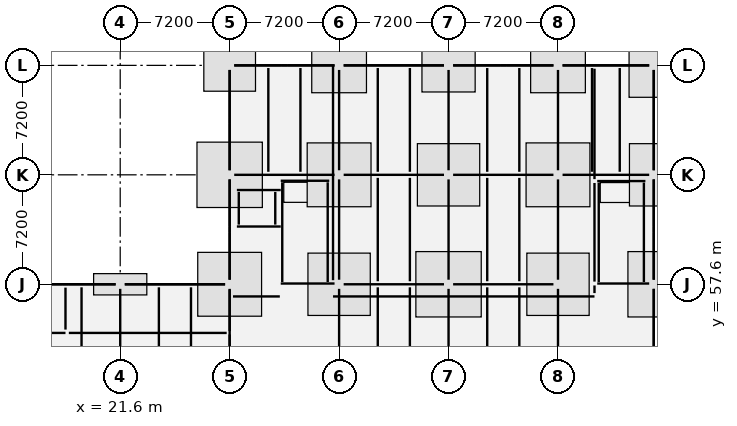
"""IFC4 building model, lengths in metres.
Left out: names, types, materials, properties, quantities, classifications, styles, units other than length and angle.
Written with IfcOpenShell. Run it as: python <this file> out.ifc"""

import sys

from ifc_helpers import new_model, si_unit, direction, frame, frame_2d, origin, origin_2d, place, context, subcontext, project, spatial, rectangle, extrude, element, fill, save


model = new_model("IFC4")
c1 = context("Model", 3, precision=1e-05, world=origin(), true_north=direction((0.0, 1.0)))
c2 = subcontext(c1, "Body", "Model", "MODEL_VIEW")
j1 = project(units=[si_unit("LENGTHUNIT", "METRE"), si_unit("PLANEANGLEUNIT", "RADIAN")], contexts=[c1])
p1 = place(None, origin())
s1 = spatial("IfcSite", under=j1, at=p1, CompositionType="ELEMENT")
p2 = place(p1, origin())
s2 = spatial("IfcBuilding", under=s1, at=p2, CompositionType="ELEMENT")
p3 = place(p2, origin())
s3 = spatial("IfcBuildingStorey", under=s2, at=p3, CompositionType="ELEMENT", Elevation=0.0)
for number, where, z_axis, x_axis in (
    (1, (21.6, 57.6, 0.0), (0.0, 0.0, 1.0), (1.0, 0.0, 0.0)),
    (2, (28.8, 57.6, 0.0), (0.0, 0.0, 1.0), (1.0, 0.0, 0.0)),
    (3, (28.8, 64.8, 0.0), (0.0, 0.0, 1.0), (1.0, 0.0, 0.0)),
    (4, (28.8, 72.0, 0.0), (0.0, 0.0, 1.0), (1.0, 0.0, 0.0)),
    (5, (36.0, 57.6, 0.0), (0.0, 0.0, 1.0), (1.0, 0.0, 0.0)),
    (6, (36.0, 64.8, 0.0), (0.0, 0.0, 1.0), (1.0, 0.0, 0.0)),
    (7, (36.0, 72.0, 0.0), (0.0, 0.0, 1.0), (1.0, 0.0, 0.0)),
    (8, (43.2, 57.6, 0.0), (0.0, 0.0, 1.0), (1.0, 0.0, 0.0)),
    (9, (43.2, 64.8, 0.0), (0.0, 0.0, 1.0), (1.0, 0.0, 0.0)),
    (10, (43.2, 72.0, 0.0), (0.0, 0.0, 1.0), (1.0, 0.0, 0.0)),
    (11, (50.4, 57.6, 0.0), (0.0, 0.0, 1.0), (1.0, 0.0, 0.0)),
    (12, (50.4, 64.8, 0.0), (0.0, 0.0, 1.0), (1.0, 0.0, 0.0)),
    (13, (50.4, 72.0, 0.0), (0.0, 0.0, 1.0), (1.0, 0.0, 0.0)),
    (14, (56.7, 57.6, 0.0), (0.0, 0.0, 1.0), (1.0, 0.0, 0.0)),
    (15, (56.7, 64.8, 0.0), (0.0, 0.0, 1.0), (1.0, 0.0, 0.0)),
    (16, (56.7, 72.0, 0.0), (0.0, 0.0, 1.0), (1.0, 0.0, 0.0)),
):
    element("IfcColumn", number, at=place(p3, frame(where, z_axis=z_axis, x_axis=x_axis)), inside=s3, PredefinedType="COLUMN", context=c2, shape_type="SweptSolid", body=[
        extrude(rectangle(XDim=0.6, YDim=0.6, at=origin_2d()), origin(), (0.0, 0.0, 1.0), 5.4),
    ])
p4 = place(p3, frame((29.275, 61.4, 0.0), z_axis=(0.0, 0.0, 1.0), x_axis=(1.0, 0.0, 0.0)))
e17 = element("IfcWall", 17, at=p4, inside=s3, PredefinedType="SHEAR", context=c2, shape_type="SweptSolid", body=[
    extrude(rectangle(XDim=2.885, YDim=0.25, at=frame_2d((1.442, 0.0))), origin(), (0.0, 0.0, 1.0), 5.15),
])
p5 = place(p4, frame((0.942, 0.0, 0.0)))
e18 = element("IfcOpeningElement", 18, at=p5, cuts=e17, PredefinedType="OPENING", context=c2, shape_type="SweptSolid", body=[
    extrude(rectangle(XDim=1.0, YDim=2.1, at=frame_2d((0.5, 1.05))), frame((0.0, 0.137, 0.0), z_axis=(0.0, -1.0, 0.0), x_axis=(1.0, 0.0, 0.0)), (0.0, 0.0, 1.0), 0.274),
])
p6 = place(p3, frame((29.275, 63.8, 0.0), z_axis=(0.0, 0.0, 1.0), x_axis=(1.0, 0.0, 0.0)))
e19 = element("IfcWall", 19, at=p6, inside=s3, PredefinedType="SHEAR", context=c2, shape_type="SweptSolid", body=[
    extrude(rectangle(XDim=2.885, YDim=0.25, at=frame_2d((1.442, 0.0))), origin(), (0.0, 0.0, 1.0), 5.15),
])
for number, where, z_axis, x_axis in (
    (20, (29.4, 61.525, 0.0), (0.0, 0.0, 1.0), (0.0, 1.0, 0.0)),
    (21, (31.8, 61.525, 0.0), (0.0, 0.0, 1.0), (0.0, 1.0, 0.0)),
):
    element("IfcWall", number, at=place(p3, frame(where, z_axis=z_axis, x_axis=x_axis)), inside=s3, PredefinedType="SHEAR", context=c2, shape_type="SweptSolid", body=[
        extrude(rectangle(XDim=2.15, YDim=0.25, at=frame_2d((1.075, 0.0))), origin(), (0.0, 0.0, 1.0), 5.15),
    ])
p7 = place(p3, frame((32.16, 57.65, 0.0), z_axis=(0.0, 0.0, 1.0), x_axis=(1.0, 0.0, 0.0)))
e22 = element("IfcWall", 22, at=p7, inside=s3, PredefinedType="SHEAR", context=c2, shape_type="SweptSolid", body=[
    extrude(rectangle(XDim=3.54, YDim=0.2, at=frame_2d((1.77, 0.0))), origin(), (0.0, 0.0, 1.0), 5.15),
])
p8 = place(p7, frame((1.22, 0.0, 0.0)))
e23 = element("IfcOpeningElement", 23, at=p8, cuts=e22, PredefinedType="OPENING", context=c2, shape_type="SweptSolid", body=[
    extrude(rectangle(XDim=1.1, YDim=2.15, at=frame_2d((0.55, 1.075))), frame((0.0, 0.112, 0.0), z_axis=(0.0, -1.0, 0.0), x_axis=(1.0, 0.0, 0.0)), (0.0, 0.0, 1.0), 0.224),
])
p9 = place(p3, frame((32.16, 64.41, 0.0), z_axis=(0.0, 0.0, 1.0), x_axis=(1.0, 0.0, 0.0)))
e24 = element("IfcWall", 24, at=p9, inside=s3, PredefinedType="SHEAR", context=c2, shape_type="SweptSolid", body=[
    extrude(rectangle(XDim=3.19, YDim=0.2, at=frame_2d((1.595, 0.0))), origin(), (0.0, 0.0, 1.0), 5.15),
])
for number, where, z_axis, x_axis in (
    (25, (32.26, 57.75, 0.0), (0.0, 0.0, 1.0), (0.0, 1.0, 0.0)),
    (26, (35.25, 57.75, 0.0), (0.0, 0.0, 1.0), (0.0, 1.0, 0.0)),
):
    element("IfcWall", number, at=place(p3, frame(where, z_axis=z_axis, x_axis=x_axis)), inside=s3, PredefinedType="SHEAR", context=c2, shape_type="SweptSolid", body=[
        extrude(rectangle(XDim=6.56, YDim=0.2, at=frame_2d((3.28, 0.0))), origin(), (0.0, 0.0, 1.0), 5.15),
    ])
p10 = place(p3, frame((52.98, 57.65, 0.0), z_axis=(0.0, 0.0, 1.0), x_axis=(1.0, 0.0, 0.0)))
e27 = element("IfcWall", 27, at=p10, inside=s3, PredefinedType="SHEAR", context=c2, shape_type="SweptSolid", body=[
    extrude(rectangle(XDim=3.42, YDim=0.2, at=frame_2d((1.71, 0.0))), origin(), (0.0, 0.0, 1.0), 5.15),
])
p11 = place(p10, frame((1.16, 0.0, 0.0)))
e28 = element("IfcOpeningElement", 28, at=p11, cuts=e27, PredefinedType="OPENING", context=c2, shape_type="SweptSolid", body=[
    extrude(rectangle(XDim=1.1, YDim=2.15, at=frame_2d((0.55, 1.075))), frame((0.0, 0.112, 0.0), z_axis=(0.0, -1.0, 0.0), x_axis=(1.0, 0.0, 0.0)), (0.0, 0.0, 1.0), 0.224),
])
p12 = place(p3, frame((52.98, 64.39, 0.0), z_axis=(0.0, 0.0, 1.0), x_axis=(1.0, 0.0, 0.0)))
e29 = element("IfcWall", 29, at=p12, inside=s3, PredefinedType="SHEAR", context=c2, shape_type="SweptSolid", body=[
    extrude(rectangle(XDim=3.17, YDim=0.2, at=frame_2d((1.585, 0.0))), origin(), (0.0, 0.0, 1.0), 5.15),
])
for number, where, z_axis, x_axis in (
    (30, (53.08, 57.75, 0.0), (0.0, 0.0, 1.0), (0.0, 1.0, 0.0)),
    (31, (56.05, 57.75, 0.0), (0.0, 0.0, 1.0), (0.0, 1.0, 0.0)),
):
    element("IfcWall", number, at=place(p3, frame(where, z_axis=z_axis, x_axis=x_axis)), inside=s3, PredefinedType="SHEAR", context=c2, shape_type="SweptSolid", body=[
        extrude(rectangle(XDim=6.54, YDim=0.2, at=frame_2d((3.27, 0.0))), origin(), (0.0, 0.0, 1.0), 5.15),
    ])
p13 = place(p3, frame((17.8, 57.6, 0.0), z_axis=(0.0, 0.0, 1.0), x_axis=(1.0, 0.0, 0.0)))
e32 = element("IfcWall", 32, at=p13, inside=s3, PredefinedType="SOLIDWALL", context=c2, shape_type="SweptSolid", body=[
    extrude(rectangle(XDim=0.4, YDim=0.36, at=frame_2d((0.2, 0.0))), origin(), (0.0, 0.0, 1.0), 4.45),
])
p14 = place(p3, frame((21.9, 57.6, 0.0), z_axis=(0.0, 0.0, 1.0), x_axis=(1.0, 0.0, 0.0)))
e33 = element("IfcWall", 33, at=p14, inside=s3, PredefinedType="ELEMENTEDWALL", context=c2, shape_type="SweptSolid", body=[
    extrude(rectangle(XDim=6.6, YDim=0.32, at=frame_2d((3.3, 0.0))), origin(), (0.0, 0.0, 1.0), 4.4),
])
p15 = place(p14, frame((2.625, 0.0, 0.85)))
e34 = element("IfcOpeningElement", 34, at=p15, cuts=e33, PredefinedType="OPENING", context=c2, shape_type="SweptSolid", body=[
    extrude(rectangle(XDim=1.35, YDim=2.0, at=frame_2d((0.675, 1.0))), frame((0.0, 0.172, 0.0), z_axis=(0.0, -1.0, 0.0), x_axis=(1.0, 0.0, 0.0)), (0.0, 0.0, 1.0), 0.344),
])
p16 = place(p3, frame((28.8, 61.0, 0.0), z_axis=(0.0, 0.0, 1.0), x_axis=(0.0, 1.0, 0.0)))
e35 = element("IfcWall", 35, at=p16, inside=s3, PredefinedType="SOLIDWALL", context=c2, shape_type="SweptSolid", body=[
    extrude(rectangle(XDim=0.4, YDim=0.36, at=frame_2d((0.2, 0.0))), origin(), (0.0, 0.0, 1.0), 4.54),
])
for number, where, z_axis, x_axis in (
    (36, (28.8, 68.2, 0.0), (0.0, 0.0, 1.0), (0.0, 1.0, 0.0)),
    (37, (32.2, 72.0, 0.0), (0.0, 0.0, 1.0), (1.0, 0.0, 0.0)),
):
    element("IfcWall", number, at=place(p3, frame(where, z_axis=z_axis, x_axis=x_axis)), inside=s3, PredefinedType="SOLIDWALL", context=c2, shape_type="SweptSolid", body=[
        extrude(rectangle(XDim=0.4, YDim=0.36, at=frame_2d((0.2, 0.0))), origin(), (0.0, 0.0, 1.0), 4.49),
    ])
p17 = place(p3, frame((36.3, 72.0, 0.0), z_axis=(0.0, 0.0, 1.0), x_axis=(1.0, 0.0, 0.0)))
e38 = element("IfcWall", 38, at=p17, inside=s3, PredefinedType="ELEMENTEDWALL", context=c2, shape_type="SweptSolid", body=[
    extrude(rectangle(XDim=6.6, YDim=0.32, at=frame_2d((3.3, 0.0))), origin(), (0.0, 0.0, 1.0), 4.49),
])
p18 = place(p17, frame((2.25, 0.0, 0.85)))
e39 = element("IfcOpeningElement", 39, at=p18, cuts=e38, PredefinedType="OPENING", context=c2, shape_type="SweptSolid", body=[
    extrude(rectangle(XDim=2.1, YDim=2.15, at=frame_2d((1.05, 1.075))), frame((0.0, 0.172, 0.0), z_axis=(0.0, -1.0, 0.0), x_axis=(1.0, 0.0, 0.0)), (0.0, 0.0, 1.0), 0.344),
])
p19 = place(p3, frame((46.6, 72.0, 0.0), z_axis=(0.0, 0.0, 1.0), x_axis=(1.0, 0.0, 0.0)))
e40 = element("IfcWall", 40, at=p19, inside=s3, PredefinedType="SOLIDWALL", context=c2, shape_type="SweptSolid", body=[
    extrude(rectangle(XDim=0.4, YDim=0.36, at=frame_2d((0.2, 0.0))), origin(), (0.0, 0.0, 1.0), 4.49),
])
p20 = place(p3, frame((50.7, 72.0, 0.0), z_axis=(0.0, 0.0, 1.0), x_axis=(1.0, 0.0, 0.0)))
e41 = element("IfcWall", 41, at=p20, inside=s3, PredefinedType="ELEMENTEDWALL", context=c2, shape_type="SweptSolid", body=[
    extrude(rectangle(XDim=5.7, YDim=0.32, at=frame_2d((2.85, 0.0))), origin(), (0.0, 0.0, 1.0), 4.49),
])
p21 = place(p3, frame((56.7, 68.6, 0.0), z_axis=(0.0, 0.0, 1.0), x_axis=(0.0, -1.0, 0.0)))
e42 = element("IfcWall", 42, at=p21, inside=s3, PredefinedType="SOLIDWALL", context=c2, shape_type="SweptSolid", body=[
    extrude(rectangle(XDim=0.4, YDim=0.36, at=frame_2d((0.2, 0.0))), origin(), (0.0, 0.0, 1.0), 4.49),
])
p22 = place(p3, frame((56.7, 61.4, 0.0), z_axis=(0.0, 0.0, 1.0), x_axis=(0.0, -1.0, 0.0)))
e43 = element("IfcWall", 43, at=p22, inside=s3, PredefinedType="SOLIDWALL", context=c2, shape_type="SweptSolid", body=[
    extrude(rectangle(XDim=0.4, YDim=0.36, at=frame_2d((0.2, 0.0))), origin(), (0.0, 0.0, 1.0), 4.54),
])
p23 = place(p3, frame((56.7, 57.3, 0.0), z_axis=(0.0, 0.0, 1.0), x_axis=(0.0, -1.0, 0.0)))
e44 = element("IfcWall", 44, at=p23, inside=s3, PredefinedType="ELEMENTEDWALL", context=c2, shape_type="SweptSolid", body=[
    extrude(rectangle(XDim=6.6, YDim=0.32, at=frame_2d((3.3, 0.0))), origin(), (0.0, 0.0, 1.0), 4.49),
])
p24 = place(p23, frame((2.4, 0.0, 0.0)))
e45 = element("IfcOpeningElement", 45, at=p24, cuts=e44, PredefinedType="OPENING", context=c2, shape_type="SweptSolid", body=[
    extrude(rectangle(XDim=1.8, YDim=2.2, at=frame_2d((0.9, 1.1))), frame((0.0, 0.172, 0.0), z_axis=(0.0, -1.0, 0.0), x_axis=(1.0, 0.0, 0.0)), (0.0, 0.0, 1.0), 0.344),
])
p25 = place(p3, frame((28.8, 52.1, 0.0), z_axis=(0.0, 0.0, 1.0), x_axis=(0.0, 1.0, 0.0)))
e46 = element("IfcWall", 46, at=p25, inside=s3, PredefinedType="PARTITIONING", context=c2, shape_type="SweptSolid", body=[
    extrude(rectangle(XDim=2.2, YDim=0.14, at=frame_2d((1.1, 0.0))), origin(), (0.0, 0.0, 1.0), 4.488),
])
p26 = place(p25, frame((0.25, 0.0, 0.0)))
e47 = element("IfcOpeningElement", 47, at=p26, cuts=e46, PredefinedType="OPENING", context=c2, shape_type="SweptSolid", body=[
    extrude(rectangle(XDim=1.65, YDim=2.2, at=frame_2d((0.825, 1.1))), frame((0.0, 0.082, 0.0), z_axis=(0.0, -1.0, 0.0), x_axis=(1.0, 0.0, 0.0)), (0.0, 0.0, 1.0), 0.164),
])
p27 = place(p3, frame((0.22, 54.4, 0.0), z_axis=(0.0, 0.0, 1.0), x_axis=(1.0, 0.0, 0.0)))
e48 = element("IfcWall", 48, at=p27, inside=s3, PredefinedType="PARTITIONING", context=c2, shape_type="SweptSolid", body=[
    extrude(rectangle(XDim=17.78, YDim=0.12, at=frame_2d((8.89, 0.0))), origin(), (0.0, 0.0, 1.0), 4.488),
])
p28 = place(p27, frame((8.39, 0.0, 0.0)))
e49 = element("IfcOpeningElement", 49, at=p28, cuts=e48, PredefinedType="OPENING", context=c2, shape_type="SweptSolid", body=[
    extrude(rectangle(XDim=1.0, YDim=2.15, at=frame_2d((0.5, 1.075))), frame((0.0, 0.072, 0.0), z_axis=(0.0, -1.0, 0.0), x_axis=(1.0, 0.0, 0.0)), (0.0, 0.0, 1.0), 0.144),
])
p29 = place(p3, frame((18.0, 54.62, 0.0), z_axis=(0.0, 0.0, 1.0), x_axis=(0.0, 1.0, 0.0)))
e50 = element("IfcWall", 50, at=p29, inside=s3, PredefinedType="PARTITIONING", context=c2, shape_type="SweptSolid", body=[
    extrude(rectangle(XDim=2.76, YDim=0.12, at=frame_2d((1.38, 0.0))), origin(), (0.0, 0.0, 1.0), 4.448),
])
p30 = place(p3, frame((18.22, 54.4, 0.0), z_axis=(0.0, 0.0, 1.0), x_axis=(1.0, 0.0, 0.0)))
e51 = element("IfcWall", 51, at=p30, inside=s3, PredefinedType="PLUMBINGWALL", context=c2, shape_type="SweptSolid", body=[
    extrude(rectangle(XDim=10.384, YDim=0.18, at=frame_2d((5.192, 0.0))), origin(), (0.0, 0.0, 1.0), 4.498),
])
p31 = place(p30, frame((4.742, 0.0, 0.0)))
e52 = element("IfcOpeningElement", 52, at=p31, cuts=e51, PredefinedType="OPENING", context=c2, shape_type="SweptSolid", body=[
    extrude(rectangle(XDim=0.9, YDim=2.1, at=frame_2d((0.45, 1.05))), frame((0.0, 0.102, 0.0), z_axis=(0.0, -1.0, 0.0), x_axis=(1.0, 0.0, 0.0)), (0.0, 0.0, 1.0), 0.204),
])
p32 = place(p3, frame((28.8, 54.52, 0.0), z_axis=(0.0, 0.0, 1.0), x_axis=(0.0, 1.0, 0.0)))
e53 = element("IfcWall", 53, at=p32, inside=s3, PredefinedType="PLUMBINGWALL", context=c2, shape_type="SweptSolid", body=[
    extrude(rectangle(XDim=2.74, YDim=0.18, at=frame_2d((1.37, 0.0))), origin(), (0.0, 0.0, 1.0), 4.488),
])
p33 = place(p3, frame((29.02, 56.8, 0.0), z_axis=(0.0, 0.0, 1.0), x_axis=(1.0, 0.0, 0.0)))
e54 = element("IfcWall", 54, at=p33, inside=s3, PredefinedType="STANDARD", context=c2, shape_type="SweptSolid", body=[
    extrude(rectangle(XDim=3.08, YDim=0.22, at=frame_2d((1.54, 0.0))), origin(), (0.0, 0.0, 1.0), 5.12),
])
p34 = place(p33, frame((0.94, 0.0, 0.0)))
e55 = element("IfcOpeningElement", 55, at=p34, cuts=e54, PredefinedType="OPENING", context=c2, shape_type="SweptSolid", body=[
    extrude(rectangle(XDim=1.2, YDim=2.2, at=frame_2d((0.6, 1.1))), frame((0.0, 0.122, 0.0), z_axis=(0.0, -1.0, 0.0), x_axis=(1.0, 0.0, 0.0)), (0.0, 0.0, 1.0), 0.244),
])
p35 = place(p3, frame((35.6, 56.8, 0.0), z_axis=(0.0, 0.0, 1.0), x_axis=(1.0, 0.0, 0.0)))
e56 = element("IfcWall", 56, at=p35, inside=s3, PredefinedType="PARTITIONING", context=c2, shape_type="SweptSolid", body=[
    extrude(rectangle(XDim=17.2, YDim=0.12, at=frame_2d((8.6, 0.0))), origin(), (0.0, 0.0, 1.0), 4.488),
])
p36 = place(p35, frame((8.225, 0.0, 0.0)))
e57 = element("IfcOpeningElement", 57, at=p36, cuts=e56, PredefinedType="OPENING", context=c2, shape_type="SweptSolid", body=[
    extrude(rectangle(XDim=1.25, YDim=2.15, at=frame_2d((0.625, 1.075))), frame((0.0, 0.072, 0.0), z_axis=(0.0, -1.0, 0.0), x_axis=(1.0, 0.0, 0.0)), (0.0, 0.0, 1.0), 0.144),
])
p37 = place(p3, frame((52.8, 57.02, 0.0), z_axis=(0.0, 0.0, 1.0), x_axis=(0.0, 1.0, 0.0)))
e58 = element("IfcWall", 58, at=p37, inside=s3, PredefinedType="PARTITIONING", context=c2, shape_type="SweptSolid", body=[
    extrude(rectangle(XDim=0.504, YDim=0.12, at=frame_2d((0.252, 0.0))), origin(), (0.0, 0.0, 1.0), 5.12),
])
p38 = place(p3, frame((52.8, 57.776, 0.0), z_axis=(0.0, 0.0, 1.0), x_axis=(0.0, 1.0, 0.0)))
e59 = element("IfcWall", 59, at=p38, inside=s3, PredefinedType="PARTITIONING", context=c2, shape_type="SweptSolid", body=[
    extrude(rectangle(XDim=6.488, YDim=0.12, at=frame_2d((3.244, 0.0))), origin(), (0.0, 0.0, 1.0), 5.12),
])
p39 = place(p3, frame((52.8, 64.516, 0.0), z_axis=(0.0, 0.0, 1.0), x_axis=(0.0, 1.0, 0.0)))
e60 = element("IfcWall", 60, at=p39, inside=s3, PredefinedType="PARTITIONING", context=c2, shape_type="SweptSolid", body=[
    extrude(rectangle(XDim=7.264, YDim=0.12, at=frame_2d((3.632, 0.0))), origin(), (0.0, 0.0, 1.0), 4.388),
])
p40 = place(p3, frame((35.6, 57.87, 0.0), z_axis=(0.0, 0.0, 1.0), x_axis=(0.0, 1.0, 0.0)))
e61 = element("IfcWall", 61, at=p40, inside=s3, PredefinedType="PARTITIONING", context=c2, shape_type="SweptSolid", body=[
    extrude(rectangle(XDim=14.13, YDim=0.12, at=frame_2d((7.065, 0.0))), origin(), (0.0, 0.0, 1.0), 4.438),
])
p41 = place(p15, origin())
e62 = element("IfcWindow", 62, at=p41, inside=s3, PartitioningType="SINGLE_PANEL", PredefinedType="WINDOW", context=c2, shape_type="SweptSolid", body=[
    extrude(rectangle(XDim=1.35, YDim=2.0, at=frame_2d((0.675, 1.0))), frame((0.0, 0.03, 0.0), z_axis=(0.0, -1.0, 0.0), x_axis=(1.0, 0.0, 0.0)), (0.0, 0.0, 1.0), 0.06),
])
fill(e34, e62)
p42 = place(p18, origin())
e63 = element("IfcWindow", 63, at=p42, inside=s3, PartitioningType="SINGLE_PANEL", PredefinedType="WINDOW", context=c2, shape_type="SweptSolid", body=[
    extrude(rectangle(XDim=2.1, YDim=2.15, at=frame_2d((1.05, 1.075))), frame((0.0, 0.03, 0.0), z_axis=(0.0, -1.0, 0.0), x_axis=(1.0, 0.0, 0.0)), (0.0, 0.0, 1.0), 0.06),
])
fill(e39, e63)
p43 = place(p24, origin())
e64 = element("IfcDoor", 64, at=p43, inside=s3, OperationType="DOUBLE_SWING_LEFT", PredefinedType="DOOR", context=c2, shape_type="SweptSolid", body=[
    extrude(rectangle(XDim=1.8, YDim=2.2, at=frame_2d((0.9, 1.1))), frame((0.0, 0.025, 0.0), z_axis=(0.0, -1.0, 0.0), x_axis=(1.0, 0.0, 0.0)), (0.0, 0.0, 1.0), 0.05),
])
fill(e45, e64)
p44 = place(p26, origin())
e65 = element("IfcDoor", 65, at=p44, inside=s3, OperationType="DOUBLE_SWING_LEFT", PredefinedType="DOOR", context=c2, shape_type="SweptSolid", body=[
    extrude(rectangle(XDim=1.65, YDim=2.2, at=frame_2d((0.825, 1.1))), frame((0.0, 0.025, 0.0), z_axis=(0.0, -1.0, 0.0), x_axis=(1.0, 0.0, 0.0)), (0.0, 0.0, 1.0), 0.05),
])
fill(e47, e65)
p45 = place(p8, frame((1.1, 0.0, 0.0), z_axis=(0.0, 0.0, 1.0), x_axis=(-1.0, 0.0, 0.0)))
e66 = element("IfcDoor", 66, at=p45, inside=s3, OperationType="SINGLE_SWING_LEFT", PredefinedType="DOOR", context=c2, shape_type="SweptSolid", body=[
    extrude(rectangle(XDim=1.1, YDim=2.15, at=frame_2d((0.55, 1.075))), frame((0.0, 0.025, 0.0), z_axis=(0.0, -1.0, 0.0), x_axis=(1.0, 0.0, 0.0)), (0.0, 0.0, 1.0), 0.05),
])
fill(e23, e66)
p46 = place(p11, frame((1.1, 0.0, 0.0), z_axis=(0.0, 0.0, 1.0), x_axis=(-1.0, 0.0, 0.0)))
e67 = element("IfcDoor", 67, at=p46, inside=s3, OperationType="SINGLE_SWING_RIGHT", PredefinedType="DOOR", context=c2, shape_type="SweptSolid", body=[
    extrude(rectangle(XDim=1.1, YDim=2.15, at=frame_2d((0.55, 1.075))), frame((0.0, 0.025, 0.0), z_axis=(0.0, -1.0, 0.0), x_axis=(1.0, 0.0, 0.0)), (0.0, 0.0, 1.0), 0.05),
])
fill(e28, e67)
p47 = place(p5, origin())
e68 = element("IfcDoor", 68, at=p47, inside=s3, OperationType="SLIDING_TO_RIGHT", PredefinedType="DOOR", context=c2, shape_type="SweptSolid", body=[
    extrude(rectangle(XDim=1.0, YDim=2.1, at=frame_2d((0.5, 1.05))), frame((0.0, 0.025, 0.0), z_axis=(0.0, -1.0, 0.0), x_axis=(1.0, 0.0, 0.0)), (0.0, 0.0, 1.0), 0.05),
])
fill(e18, e68)
p48 = place(p31, origin())
e69 = element("IfcDoor", 69, at=p48, inside=s3, OperationType="SINGLE_SWING_RIGHT", PredefinedType="DOOR", context=c2, shape_type="SweptSolid", body=[
    extrude(rectangle(XDim=0.9, YDim=2.1, at=frame_2d((0.45, 1.05))), frame((0.0, 0.025, 0.0), z_axis=(0.0, -1.0, 0.0), x_axis=(1.0, 0.0, 0.0)), (0.0, 0.0, 1.0), 0.05),
])
fill(e52, e69)
p49 = place(p34, origin())
e70 = element("IfcDoor", 70, at=p49, inside=s3, OperationType="SINGLE_SWING_LEFT", PredefinedType="DOOR", context=c2, shape_type="SweptSolid", body=[
    extrude(rectangle(XDim=1.2, YDim=2.2, at=frame_2d((0.6, 1.1))), frame((0.0, 0.025, 0.0), z_axis=(0.0, -1.0, 0.0), x_axis=(1.0, 0.0, 0.0)), (0.0, 0.0, 1.0), 0.05),
])
fill(e55, e70)
p50 = place(p36, origin())
e71 = element("IfcDoor", 71, at=p50, inside=s3, OperationType="SINGLE_SWING_LEFT", PredefinedType="DOOR", context=c2, shape_type="SweptSolid", body=[
    extrude(rectangle(XDim=1.25, YDim=2.15, at=frame_2d((0.625, 1.075))), frame((0.0, 0.025, 0.0), z_axis=(0.0, -1.0, 0.0), x_axis=(1.0, 0.0, 0.0)), (0.0, 0.0, 1.0), 0.05),
])
fill(e57, e71)
save(model, sys.argv[1])
